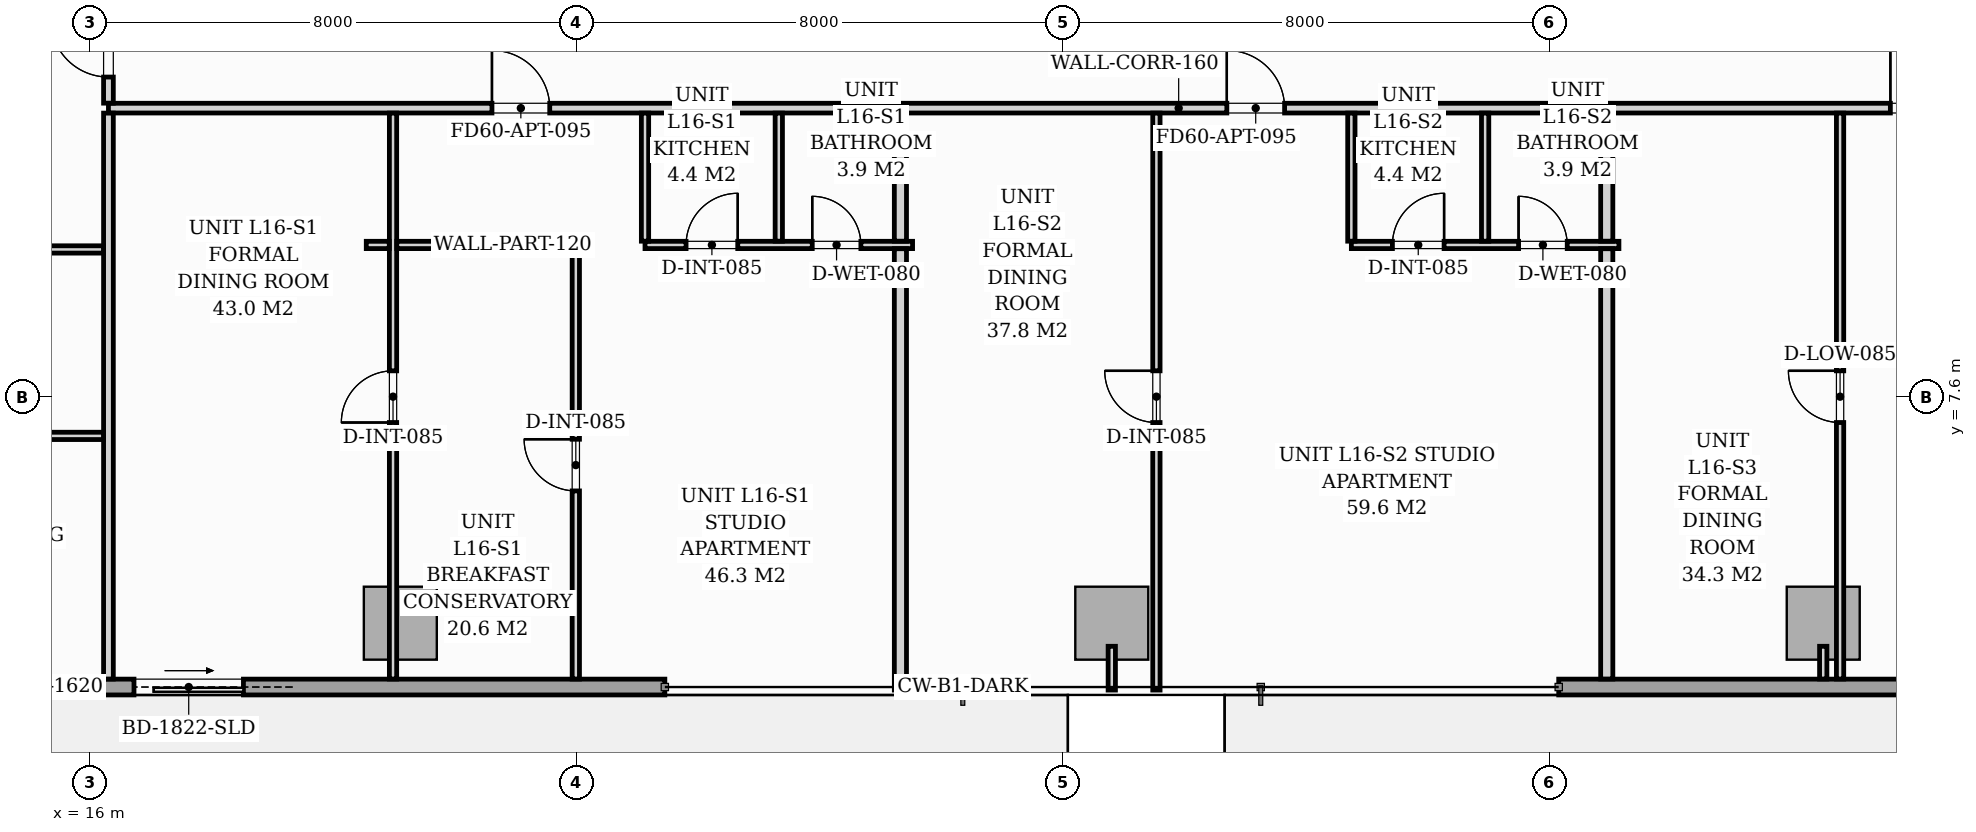
"""IFC4 building model, lengths in metres.
Left out: names, types, materials, properties, quantities, classifications, styles, units other than length and angle.
Written with IfcOpenShell. Run it as: python <this file> out.ifc"""

import sys

from ifc_helpers import new_model, si_unit, direction, frame, frame_2d, origin, origin_2d, place, context, subcontext, project, spatial, rectangle, extrude, source, transform, mapped, element, fill, save


model = new_model("IFC4")
c1 = context("Model", 3, precision=1e-05, world=origin(), true_north=direction((0.0, 1.0)))
c2 = subcontext(c1, "Body", "Model", "MODEL_VIEW")
j1 = project(units=[si_unit("LENGTHUNIT", "METRE"), si_unit("PLANEANGLEUNIT", "RADIAN")], contexts=[c1])
p1 = place(None, origin())
s1 = spatial("IfcSite", under=j1, at=p1, CompositionType="ELEMENT")
p2 = place(p1, origin())
s2 = spatial("IfcBuilding", under=s1, at=p2, CompositionType="ELEMENT")
p3 = place(p2, frame((0.0, 0.0, 58.2)))
s3 = spatial("IfcBuildingStorey", under=s2, at=p3, CompositionType="ELEMENT", Elevation=58.2)
m1 = source(origin(), c2, "Body", "SweptSolid", [
    extrude(rectangle(XDim=1.2, YDim=1.2, at=origin_2d()), origin(), (0.0, 0.0, 1.0), 3.196),
])
for number, where, z_axis, x_axis in (
    (1, (21.1, 3.88, 0.002), (0.0, 0.0, 1.0), (1.0, 0.0, 0.0)),
    (2, (32.8, 3.88, 0.002), (0.0, 0.0, 1.0), (1.0, 0.0, 0.0)),
    (3, (44.5, 3.88, 0.002), (0.0, 0.0, 1.0), (1.0, 0.0, 0.0)),
):
    element("IfcColumn", number, at=place(p3, frame(where, z_axis=z_axis, x_axis=x_axis)), inside=s3, PredefinedType="COLUMN", context=c2, shape_type="MappedRepresentation", body=[
        mapped(m1, transform((0.0, 0.0, 0.0), scale=1.0)),
    ])
p4 = place(p3, frame((57.3, 2.83, 0.0), z_axis=(0.0, 0.0, 1.0), x_axis=(-1.0, 0.0, 0.0)))
e4 = element("IfcWall", 4, at=p4, inside=s3, PredefinedType="STANDARD", context=c2, shape_type="SweptSolid", body=[
    extrude(rectangle(XDim=17.15, YDim=0.26, at=frame_2d((8.575, 0.0))), origin(), (0.0, 0.0, 1.0), 2.94),
])
p5 = place(p4, frame((8.633, 0.0, 0.0)))
e5 = element("IfcOpeningElement", 5, at=p5, cuts=e4, PredefinedType="OPENING", context=c2, shape_type="SweptSolid", body=[
    extrude(rectangle(XDim=1.8, YDim=2.06, at=frame_2d((0.9, 1.03))), frame((0.0, 0.14, 0.0), z_axis=(0.0, -1.0, 0.0), x_axis=(1.0, 0.0, 0.0)), (0.0, 0.0, 1.0), 0.28),
])
p6 = place(p4, frame((2.05, 0.0, 0.65)))
e6 = element("IfcOpeningElement", 6, at=p6, cuts=e4, PredefinedType="OPENING", context=c2, shape_type="SweptSolid", body=[
    extrude(rectangle(XDim=1.6, YDim=1.5, at=frame_2d((0.8, 0.75))), frame((0.0, 0.14, 0.0), z_axis=(0.0, -1.0, 0.0), x_axis=(1.0, 0.0, 0.0)), (0.0, 0.0, 1.0), 0.28),
])
p7 = place(p3, frame((25.45, 2.83, 0.0), z_axis=(0.0, 0.0, 1.0), x_axis=(-1.0, 0.0, 0.0)))
e7 = element("IfcWall", 7, at=p7, inside=s3, PredefinedType="STANDARD", context=c2, shape_type="SweptSolid", body=[
    extrude(rectangle(XDim=17.15, YDim=0.26, at=frame_2d((8.575, 0.0))), origin(), (0.0, 0.0, 1.0), 2.94),
])
p8 = place(p7, frame((6.93, 0.0, 0.0)))
e8 = element("IfcOpeningElement", 8, at=p8, cuts=e7, PredefinedType="OPENING", context=c2, shape_type="SweptSolid", body=[
    extrude(rectangle(XDim=1.8, YDim=2.06, at=frame_2d((0.9, 1.03))), frame((0.0, 0.14, 0.0), z_axis=(0.0, -1.0, 0.0), x_axis=(1.0, 0.0, 0.0)), (0.0, 0.0, 1.0), 0.28),
])
p9 = place(p7, frame((9.7, 0.0, 0.65)))
e9 = element("IfcOpeningElement", 9, at=p9, cuts=e7, PredefinedType="OPENING", context=c2, shape_type="SweptSolid", body=[
    extrude(rectangle(XDim=1.6, YDim=1.5, at=frame_2d((0.8, 0.75))), frame((0.0, 0.14, 0.0), z_axis=(0.0, -1.0, 0.0), x_axis=(1.0, 0.0, 0.0)), (0.0, 0.0, 1.0), 0.28),
])
p10 = place(p3, frame((16.3, 12.35, 0.0), z_axis=(0.0, 0.0, 1.0), x_axis=(1.0, 0.0, 0.0)))
e10 = element("IfcWall", 10, at=p10, inside=s3, PredefinedType="PARTITIONING", context=c2, shape_type="SweptSolid", body=[
    extrude(rectangle(XDim=35.2, YDim=0.16, at=frame_2d((17.6, 0.0))), origin(), (0.0, 0.0, 1.0), 2.94),
])
p11 = place(p10, frame((6.307, 0.0, 0.0)))
e11 = element("IfcOpeningElement", 11, at=p11, cuts=e10, PredefinedType="OPENING", context=c2, shape_type="SweptSolid", body=[
    extrude(rectangle(XDim=0.95, YDim=2.06, at=frame_2d((0.475, 1.03))), frame((0.0, 0.09, 0.0), z_axis=(0.0, -1.0, 0.0), x_axis=(1.0, 0.0, 0.0)), (0.0, 0.0, 1.0), 0.18),
])
p12 = place(p10, frame((18.392, 0.0, 0.0)))
e12 = element("IfcOpeningElement", 12, at=p12, cuts=e10, PredefinedType="OPENING", context=c2, shape_type="SweptSolid", body=[
    extrude(rectangle(XDim=0.95, YDim=2.06, at=frame_2d((0.475, 1.03))), frame((0.0, 0.09, 0.0), z_axis=(0.0, -1.0, 0.0), x_axis=(1.0, 0.0, 0.0)), (0.0, 0.0, 1.0), 0.18),
])
p13 = place(p10, frame((29.304, 0.0, 0.0)))
e13 = element("IfcOpeningElement", 13, at=p13, cuts=e10, PredefinedType="OPENING", context=c2, shape_type="SweptSolid", body=[
    extrude(rectangle(XDim=0.95, YDim=2.06, at=frame_2d((0.475, 1.03))), frame((0.0, 0.09, 0.0), z_axis=(0.0, -1.0, 0.0), x_axis=(1.0, 0.0, 0.0)), (0.0, 0.0, 1.0), 0.18),
])
p14 = place(p3, frame((16.3, 2.962, 0.0), z_axis=(0.0, 0.0, 1.0), x_axis=(0.0, 1.0, 0.0)))
e14 = element("IfcWall", 14, at=p14, inside=s3, PredefinedType="PARTITIONING", context=c2, shape_type="SweptSolid", body=[
    extrude(rectangle(XDim=9.306, YDim=0.16, at=frame_2d((4.653, 0.0))), origin(), (0.0, 0.0, 1.0), 2.94),
])
p15 = place(p3, frame((16.3, 12.432, 0.0), z_axis=(0.0, 0.0, 1.0), x_axis=(0.0, 1.0, 0.0)))
e15 = element("IfcWall", 15, at=p15, inside=s3, PredefinedType="PARTITIONING", context=c2, shape_type="SweptSolid", body=[
    extrude(rectangle(XDim=15.006, YDim=0.16, at=frame_2d((7.503, 0.0))), origin(), (0.0, 0.0, 1.0), 2.94),
])
p16 = place(p15, frame((0.429, 0.0, 0.0)))
e16 = element("IfcOpeningElement", 16, at=p16, cuts=e15, PredefinedType="OPENING", context=c2, shape_type="SweptSolid", body=[
    extrude(rectangle(XDim=0.95, YDim=2.06, at=frame_2d((0.475, 1.03))), frame((0.0, 0.09, 0.0), z_axis=(0.0, -1.0, 0.0), x_axis=(1.0, 0.0, 0.0)), (0.0, 0.0, 1.0), 0.18),
])
p17 = place(p3, frame((25.124, 10.1, 0.0), z_axis=(0.0, 0.0, 1.0), x_axis=(1.0, 0.0, 0.0)))
e17 = element("IfcWall", 17, at=p17, inside=s3, PredefinedType="PARTITIONING", context=c2, shape_type="SweptSolid", body=[
    extrude(rectangle(XDim=4.4, YDim=0.12, at=frame_2d((2.2, 0.0))), origin(), (0.0, 0.0, 1.0), 2.94),
])
p18 = place(p17, frame((0.675, 0.0, 0.0)))
e18 = element("IfcOpeningElement", 18, at=p18, cuts=e17, PredefinedType="OPENING", context=c2, shape_type="SweptSolid", body=[
    extrude(rectangle(XDim=0.85, YDim=2.05, at=frame_2d((0.425, 1.025))), frame((0.0, 0.07, 0.0), z_axis=(0.0, -1.0, 0.0), x_axis=(1.0, 0.0, 0.0)), (0.0, 0.0, 1.0), 0.14),
])
p19 = place(p17, frame((2.75, 0.0, 0.0)))
e19 = element("IfcOpeningElement", 19, at=p19, cuts=e17, PredefinedType="OPENING", context=c2, shape_type="SweptSolid", body=[
    extrude(rectangle(XDim=0.8, YDim=2.02, at=frame_2d((0.4, 1.01))), frame((0.0, 0.07, 0.0), z_axis=(0.0, -1.0, 0.0), x_axis=(1.0, 0.0, 0.0)), (0.0, 0.0, 1.0), 0.14),
])
for number, where, z_axis, x_axis in (
    (20, (25.124, 10.162, 0.0), (0.0, 0.0, 1.0), (0.0, 1.0, 0.0)),
    (21, (27.324, 10.162, 0.0), (0.0, 0.0, 1.0), (0.0, 1.0, 0.0)),
):
    element("IfcWall", number, at=place(p3, frame(where, z_axis=z_axis, x_axis=x_axis)), inside=s3, PredefinedType="PARTITIONING", context=c2, shape_type="SweptSolid", body=[
        extrude(rectangle(XDim=2.106, YDim=0.12, at=frame_2d((1.053, 0.0))), origin(), (0.0, 0.0, 1.0), 2.94),
    ])
p20 = place(p3, frame((20.98, 2.962, 0.0), z_axis=(0.0, 0.0, 1.0), x_axis=(0.0, 1.0, 0.0)))
e22 = element("IfcWall", 22, at=p20, inside=s3, PredefinedType="PARTITIONING", context=c2, shape_type="SweptSolid", body=[
    extrude(rectangle(XDim=9.306, YDim=0.12, at=frame_2d((4.653, 0.0))), origin(), (0.0, 0.0, 1.0), 2.94),
])
p21 = place(p20, frame((4.218, 0.0, 0.0)))
e23 = element("IfcOpeningElement", 23, at=p21, cuts=e22, PredefinedType="OPENING", context=c2, shape_type="SweptSolid", body=[
    extrude(rectangle(XDim=0.85, YDim=2.05, at=frame_2d((0.425, 1.025))), frame((0.0, 0.07, 0.0), z_axis=(0.0, -1.0, 0.0), x_axis=(1.0, 0.0, 0.0)), (0.0, 0.0, 1.0), 0.14),
])
p22 = place(p3, frame((23.986, 2.962, 0.0), z_axis=(0.0, 0.0, 1.0), x_axis=(0.0, 1.0, 0.0)))
e24 = element("IfcWall", 24, at=p22, inside=s3, PredefinedType="PARTITIONING", context=c2, shape_type="SweptSolid", body=[
    extrude(rectangle(XDim=7.138, YDim=0.12, at=frame_2d((3.569, 0.0))), origin(), (0.0, 0.0, 1.0), 2.94),
])
p23 = place(p22, frame((3.093, 0.0, 0.0)))
e25 = element("IfcOpeningElement", 25, at=p23, cuts=e24, PredefinedType="OPENING", context=c2, shape_type="SweptSolid", body=[
    extrude(rectangle(XDim=0.85, YDim=2.05, at=frame_2d((0.425, 1.025))), frame((0.0, 0.07, 0.0), z_axis=(0.0, -1.0, 0.0), x_axis=(1.0, 0.0, 0.0)), (0.0, 0.0, 1.0), 0.14),
])
p24 = place(p3, frame((20.54, 10.1, 0.0), z_axis=(0.0, 0.0, 1.0), x_axis=(1.0, 0.0, 0.0)))
e26 = element("IfcWall", 26, at=p24, inside=s3, PredefinedType="PARTITIONING", context=c2, shape_type="SweptSolid", body=[
    extrude(rectangle(XDim=0.378, YDim=0.12, at=frame_2d((0.189, 0.0))), origin(), (0.0, 0.0, 1.0), 2.94),
])
p25 = place(p3, frame((21.042, 10.1, 0.0), z_axis=(0.0, 0.0, 1.0), x_axis=(1.0, 0.0, 0.0)))
e27 = element("IfcWall", 27, at=p25, inside=s3, PredefinedType="PARTITIONING", context=c2, shape_type="SweptSolid", body=[
    extrude(rectangle(XDim=2.882, YDim=0.12, at=frame_2d((1.441, 0.0))), origin(), (0.0, 0.0, 1.0), 2.94),
])
p26 = place(p3, frame((29.324, 2.78, 0.0), z_axis=(0.0, 0.0, 1.0), x_axis=(0.0, 1.0, 0.0)))
e28 = element("IfcWall", 28, at=p26, inside=s3, PredefinedType="PARTITIONING", context=c2, shape_type="SweptSolid", body=[
    extrude(rectangle(XDim=7.258, YDim=0.2, at=frame_2d((3.629, 0.0))), origin(), (0.0, 0.0, 1.0), 2.94),
])
p27 = place(p3, frame((29.324, 10.162, 0.0), z_axis=(0.0, 0.0, 1.0), x_axis=(0.0, 1.0, 0.0)))
e29 = element("IfcWall", 29, at=p27, inside=s3, PredefinedType="PARTITIONING", context=c2, shape_type="SweptSolid", body=[
    extrude(rectangle(XDim=2.106, YDim=0.2, at=frame_2d((1.053, 0.0))), origin(), (0.0, 0.0, 1.0), 2.94),
])
p28 = place(p3, frame((36.74, 10.1, 0.0), z_axis=(0.0, 0.0, 1.0), x_axis=(1.0, 0.0, 0.0)))
e30 = element("IfcWall", 30, at=p28, inside=s3, PredefinedType="PARTITIONING", context=c2, shape_type="SweptSolid", body=[
    extrude(rectangle(XDim=4.4, YDim=0.12, at=frame_2d((2.2, 0.0))), origin(), (0.0, 0.0, 1.0), 2.94),
])
p29 = place(p28, frame((0.675, 0.0, 0.0)))
e31 = element("IfcOpeningElement", 31, at=p29, cuts=e30, PredefinedType="OPENING", context=c2, shape_type="SweptSolid", body=[
    extrude(rectangle(XDim=0.85, YDim=2.05, at=frame_2d((0.425, 1.025))), frame((0.0, 0.07, 0.0), z_axis=(0.0, -1.0, 0.0), x_axis=(1.0, 0.0, 0.0)), (0.0, 0.0, 1.0), 0.14),
])
p30 = place(p28, frame((2.75, 0.0, 0.0)))
e32 = element("IfcOpeningElement", 32, at=p30, cuts=e30, PredefinedType="OPENING", context=c2, shape_type="SweptSolid", body=[
    extrude(rectangle(XDim=0.8, YDim=2.02, at=frame_2d((0.4, 1.01))), frame((0.0, 0.07, 0.0), z_axis=(0.0, -1.0, 0.0), x_axis=(1.0, 0.0, 0.0)), (0.0, 0.0, 1.0), 0.14),
])
for number, where, z_axis, x_axis in (
    (33, (36.74, 10.162, 0.0), (0.0, 0.0, 1.0), (0.0, 1.0, 0.0)),
    (34, (38.94, 10.162, 0.0), (0.0, 0.0, 1.0), (0.0, 1.0, 0.0)),
):
    element("IfcWall", number, at=place(p3, frame(where, z_axis=z_axis, x_axis=x_axis)), inside=s3, PredefinedType="PARTITIONING", context=c2, shape_type="SweptSolid", body=[
        extrude(rectangle(XDim=2.106, YDim=0.12, at=frame_2d((1.053, 0.0))), origin(), (0.0, 0.0, 1.0), 2.94),
    ])
p31 = place(p3, frame((33.534, 2.78, 0.0), z_axis=(0.0, 0.0, 1.0), x_axis=(0.0, 1.0, 0.0)))
e35 = element("IfcWall", 35, at=p31, inside=s3, PredefinedType="PARTITIONING", context=c2, shape_type="SweptSolid", body=[
    extrude(rectangle(XDim=9.488, YDim=0.12, at=frame_2d((4.744, 0.0))), origin(), (0.0, 0.0, 1.0), 2.94),
])
p32 = place(p31, frame((4.4, 0.0, 0.0)))
e36 = element("IfcOpeningElement", 36, at=p32, cuts=e35, PredefinedType="OPENING", context=c2, shape_type="SweptSolid", body=[
    extrude(rectangle(XDim=0.85, YDim=2.05, at=frame_2d((0.425, 1.025))), frame((0.0, 0.07, 0.0), z_axis=(0.0, -1.0, 0.0), x_axis=(1.0, 0.0, 0.0)), (0.0, 0.0, 1.0), 0.14),
])
p33 = place(p3, frame((40.94, 2.962, 0.0), z_axis=(0.0, 0.0, 1.0), x_axis=(0.0, 1.0, 0.0)))
e37 = element("IfcWall", 37, at=p33, inside=s3, PredefinedType="PARTITIONING", context=c2, shape_type="SweptSolid", body=[
    extrude(rectangle(XDim=7.076, YDim=0.2, at=frame_2d((3.538, 0.0))), origin(), (0.0, 0.0, 1.0), 2.94),
])
p34 = place(p3, frame((40.94, 10.162, 0.0), z_axis=(0.0, 0.0, 1.0), x_axis=(0.0, 1.0, 0.0)))
e38 = element("IfcWall", 38, at=p34, inside=s3, PredefinedType="PARTITIONING", context=c2, shape_type="SweptSolid", body=[
    extrude(rectangle(XDim=2.106, YDim=0.2, at=frame_2d((1.053, 0.0))), origin(), (0.0, 0.0, 1.0), 2.94),
])
p35 = place(p3, frame((44.777, 2.962, 0.0), z_axis=(0.0, 0.0, 1.0), x_axis=(0.0, 1.0, 0.0)))
e39 = element("IfcWall", 39, at=p35, inside=s3, PredefinedType="PARTITIONING", context=c2, shape_type="SweptSolid", body=[
    extrude(rectangle(XDim=9.306, YDim=0.12, at=frame_2d((4.653, 0.0))), origin(), (0.0, 0.0, 1.0), 2.136),
])
p36 = place(p35, frame((4.218, 0.0, 0.0)))
e40 = element("IfcOpeningElement", 40, at=p36, cuts=e39, PredefinedType="OPENING", context=c2, shape_type="SweptSolid", body=[
    extrude(rectangle(XDim=0.85, YDim=2.01, at=frame_2d((0.425, 1.005))), frame((0.0, 0.07, 0.0), z_axis=(0.0, -1.0, 0.0), x_axis=(1.0, 0.0, 0.0)), (0.0, 0.0, 1.0), 0.14),
])
p37 = place(p3, frame((5.88, 6.96, 0.0), z_axis=(0.0, 0.0, 1.0), x_axis=(1.0, 0.0, 0.0)))
e41 = element("IfcWall", 41, at=p37, inside=s3, PredefinedType="PARTITIONING", context=c2, shape_type="SweptSolid", body=[
    extrude(rectangle(XDim=10.338, YDim=0.12, at=frame_2d((5.169, 0.0))), origin(), (0.0, 0.0, 1.0), 2.94),
])
p38 = place(p37, frame((4.735, 0.0, 0.0)))
e42 = element("IfcOpeningElement", 42, at=p38, cuts=e41, PredefinedType="OPENING", context=c2, shape_type="SweptSolid", body=[
    extrude(rectangle(XDim=0.85, YDim=2.05, at=frame_2d((0.425, 1.025))), frame((0.0, 0.07, 0.0), z_axis=(0.0, -1.0, 0.0), x_axis=(1.0, 0.0, 0.0)), (0.0, 0.0, 1.0), 0.14),
])
p39 = place(p3, frame((5.88, 10.026, 0.0), z_axis=(0.0, 0.0, 1.0), x_axis=(1.0, 0.0, 0.0)))
e43 = element("IfcWall", 43, at=p39, inside=s3, PredefinedType="PARTITIONING", context=c2, shape_type="SweptSolid", body=[
    extrude(rectangle(XDim=10.338, YDim=0.12, at=frame_2d((5.169, 0.0))), origin(), (0.0, 0.0, 1.0), 2.94),
])
p40 = place(p39, frame((4.735, 0.0, 0.0)))
e44 = element("IfcOpeningElement", 44, at=p40, cuts=e43, PredefinedType="OPENING", context=c2, shape_type="SweptSolid", body=[
    extrude(rectangle(XDim=0.85, YDim=2.05, at=frame_2d((0.425, 1.025))), frame((0.0, 0.07, 0.0), z_axis=(0.0, -1.0, 0.0), x_axis=(1.0, 0.0, 0.0)), (0.0, 0.0, 1.0), 0.14),
])
p41 = place(p3, frame((32.8, 3.5, 0.0), z_axis=(0.0, 0.0, 1.0), x_axis=(0.0, -1.0, 0.0)))
e45 = element("IfcWall", 45, at=p41, inside=s3, PredefinedType="PARTITIONING", context=c2, shape_type="SweptSolid", body=[
    extrude(rectangle(XDim=0.72, YDim=0.12, at=frame_2d((0.36, 0.0))), origin(), (0.0, 0.0, 1.0), 2.94),
])
p42 = place(p3, frame((44.5, 3.5, 0.0), z_axis=(0.0, 0.0, 1.0), x_axis=(0.0, -1.0, 0.0)))
e46 = element("IfcWall", 46, at=p42, inside=s3, PredefinedType="PARTITIONING", context=c2, shape_type="SweptSolid", body=[
    extrude(rectangle(XDim=0.538, YDim=0.12, at=frame_2d((0.269, 0.0))), origin(), (0.0, 0.0, 1.0), 2.94),
])
m2 = source(origin(), c2, "Body", "SweptSolid", [
    extrude(rectangle(XDim=1.8, YDim=2.06, at=frame_2d((0.9, 1.03))), frame((0.0, 0.025, 0.0), z_axis=(0.0, -1.0, 0.0), x_axis=(1.0, 0.0, 0.0)), (0.0, 0.0, 1.0), 0.05),
])
p43 = place(p8, origin())
e47 = element("IfcDoor", 47, at=p43, inside=s3, OperationType="SLIDING_TO_LEFT", PredefinedType="DOOR", context=c2, shape_type="MappedRepresentation", body=[
    mapped(m2, transform((0.0, 0.0, 0.0), scale=1.0)),
])
fill(e8, e47)
m3 = source(origin(), c2, "Body", "SweptSolid", [
    extrude(rectangle(XDim=1.6, YDim=1.5, at=frame_2d((0.8, 0.75))), frame((0.0, 0.03, 0.0), z_axis=(0.0, -1.0, 0.0), x_axis=(1.0, 0.0, 0.0)), (0.0, 0.0, 1.0), 0.06),
])
p44 = place(p9, origin())
e48 = element("IfcWindow", 48, at=p44, inside=s3, PartitioningType="SINGLE_PANEL", PredefinedType="WINDOW", context=c2, shape_type="MappedRepresentation", body=[
    mapped(m3, transform((0.0, 0.0, 0.0), scale=1.0)),
])
fill(e9, e48)
m4 = source(origin(), c2, "Body", "SweptSolid", [
    extrude(rectangle(XDim=0.85, YDim=2.05, at=frame_2d((0.425, 1.025))), frame((0.0, 0.025, 0.0), z_axis=(0.0, -1.0, 0.0), x_axis=(1.0, 0.0, 0.0)), (0.0, 0.0, 1.0), 0.05),
])
p45 = place(p21, origin())
e49 = element("IfcDoor", 49, at=p45, inside=s3, OperationType="SINGLE_SWING_LEFT", PredefinedType="DOOR", context=c2, shape_type="MappedRepresentation", body=[
    mapped(m4, transform((0.0, 0.0, 0.0), scale=1.0)),
])
fill(e23, e49)
p46 = place(p23, origin())
e50 = element("IfcDoor", 50, at=p46, inside=s3, OperationType="SINGLE_SWING_RIGHT", PredefinedType="DOOR", context=c2, shape_type="MappedRepresentation", body=[
    mapped(m4, transform((0.0, 0.0, 0.0), scale=1.0)),
])
fill(e25, e50)
m5 = source(origin(), c2, "Body", "SweptSolid", [
    extrude(rectangle(XDim=0.95, YDim=2.06, at=frame_2d((0.475, 1.03))), frame((0.0, 0.025, 0.0), z_axis=(0.0, -1.0, 0.0), x_axis=(1.0, 0.0, 0.0)), (0.0, 0.0, 1.0), 0.05),
])
p47 = place(p11, origin())
e51 = element("IfcDoor", 51, at=p47, inside=s3, OperationType="SINGLE_SWING_LEFT", PredefinedType="DOOR", context=c2, shape_type="MappedRepresentation", body=[
    mapped(m5, transform((0.0, 0.0, 0.0), scale=1.0)),
])
fill(e11, e51)
p48 = place(p18, origin())
e52 = element("IfcDoor", 52, at=p48, inside=s3, OperationType="SINGLE_SWING_RIGHT", PredefinedType="DOOR", context=c2, shape_type="MappedRepresentation", body=[
    mapped(m4, transform((0.0, 0.0, 0.0), scale=1.0)),
])
fill(e18, e52)
m6 = source(origin(), c2, "Body", "SweptSolid", [
    extrude(rectangle(XDim=0.8, YDim=2.02, at=frame_2d((0.4, 1.01))), frame((0.0, 0.025, 0.0), z_axis=(0.0, -1.0, 0.0), x_axis=(1.0, 0.0, 0.0)), (0.0, 0.0, 1.0), 0.05),
])
p49 = place(p19, origin())
e53 = element("IfcDoor", 53, at=p49, inside=s3, OperationType="SINGLE_SWING_LEFT", PredefinedType="DOOR", context=c2, shape_type="MappedRepresentation", body=[
    mapped(m6, transform((0.0, 0.0, 0.0), scale=1.0)),
])
fill(e19, e53)
p50 = place(p32, origin())
e54 = element("IfcDoor", 54, at=p50, inside=s3, OperationType="SINGLE_SWING_RIGHT", PredefinedType="DOOR", context=c2, shape_type="MappedRepresentation", body=[
    mapped(m4, transform((0.0, 0.0, 0.0), scale=1.0)),
])
fill(e36, e54)
p51 = place(p12, origin())
e55 = element("IfcDoor", 55, at=p51, inside=s3, OperationType="SINGLE_SWING_LEFT", PredefinedType="DOOR", context=c2, shape_type="MappedRepresentation", body=[
    mapped(m5, transform((0.0, 0.0, 0.0), scale=1.0)),
])
fill(e12, e55)
p52 = place(p29, origin())
e56 = element("IfcDoor", 56, at=p52, inside=s3, OperationType="SINGLE_SWING_RIGHT", PredefinedType="DOOR", context=c2, shape_type="MappedRepresentation", body=[
    mapped(m4, transform((0.0, 0.0, 0.0), scale=1.0)),
])
fill(e31, e56)
p53 = place(p30, origin())
e57 = element("IfcDoor", 57, at=p53, inside=s3, OperationType="SINGLE_SWING_LEFT", PredefinedType="DOOR", context=c2, shape_type="MappedRepresentation", body=[
    mapped(m6, transform((0.0, 0.0, 0.0), scale=1.0)),
])
fill(e32, e57)
m7 = source(origin(), c2, "Body", "SweptSolid", [
    extrude(rectangle(XDim=0.85, YDim=2.01, at=frame_2d((0.425, 1.005))), frame((0.0, 0.025, 0.0), z_axis=(0.0, -1.0, 0.0), x_axis=(1.0, 0.0, 0.0)), (0.0, 0.0, 1.0), 0.05),
])
p54 = place(p36, origin())
e58 = element("IfcDoor", 58, at=p54, inside=s3, OperationType="SINGLE_SWING_RIGHT", PredefinedType="DOOR", context=c2, shape_type="MappedRepresentation", body=[
    mapped(m7, transform((0.0, 0.0, 0.0), scale=1.0)),
])
fill(e40, e58)
p55 = place(p13, origin())
e59 = element("IfcDoor", 59, at=p55, inside=s3, OperationType="SINGLE_SWING_LEFT", PredefinedType="DOOR", context=c2, shape_type="MappedRepresentation", body=[
    mapped(m5, transform((0.0, 0.0, 0.0), scale=1.0)),
])
fill(e13, e59)
p56 = place(p16, origin())
e60 = element("IfcDoor", 60, at=p56, inside=s3, OperationType="SINGLE_SWING_RIGHT", PredefinedType="DOOR", context=c2, shape_type="MappedRepresentation", body=[
    mapped(m5, transform((0.0, 0.0, 0.0), scale=1.0)),
])
fill(e16, e60)
save(model, sys.argv[1])
